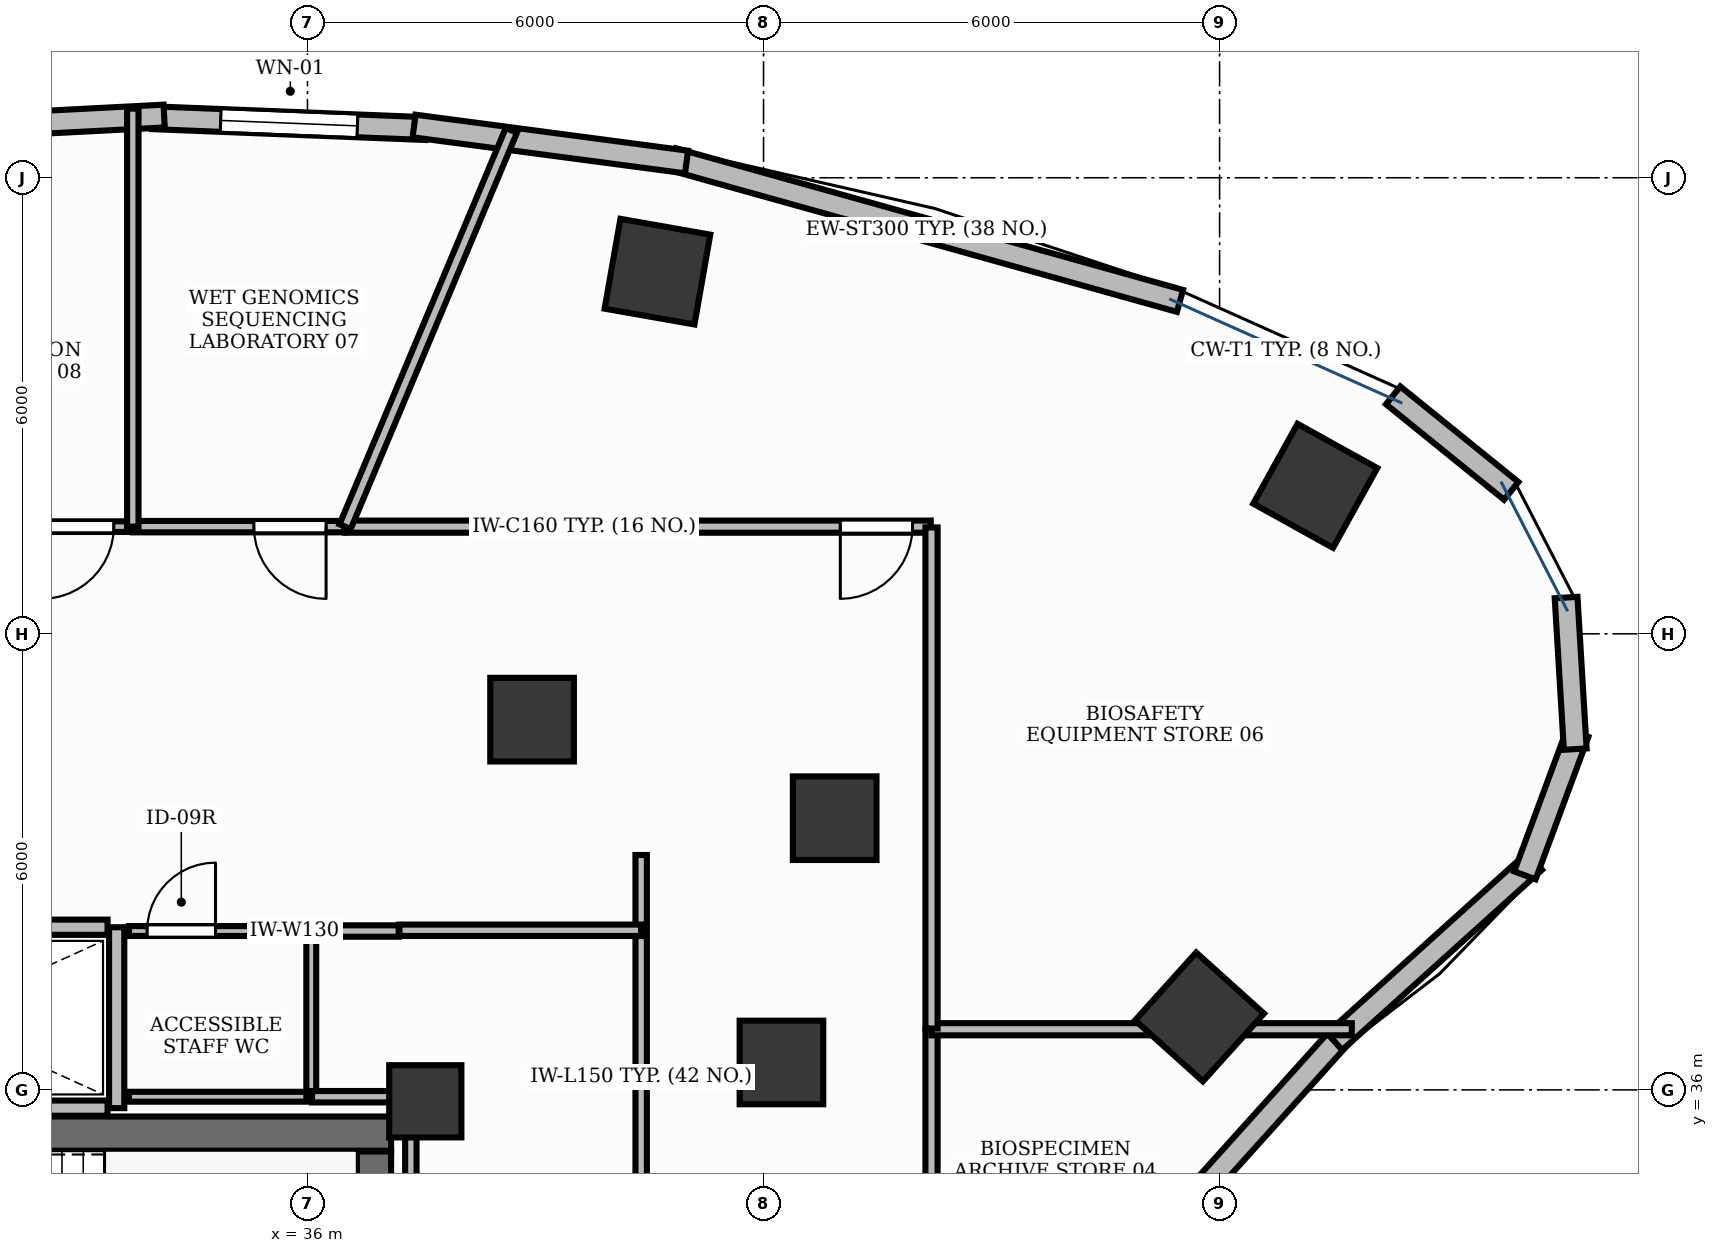
"""IFC4 building model, lengths in metres.
Left out: names, types, materials, properties, quantities, classifications, styles, units other than length and angle.
Written with IfcOpenShell. Run it as: python <this file> out.ifc"""

import sys

from ifc_helpers import new_model, si_unit, direction, frame, frame_2d, origin, origin_2d, place, context, subcontext, project, spatial, rectangle, extrude, element, fill, save


model = new_model("IFC4")
c1 = context("Model", 3, precision=1e-05, world=origin(), true_north=direction((0.0, 1.0)))
c2 = subcontext(c1, "Body", "Model", "MODEL_VIEW")
j1 = project(units=[si_unit("LENGTHUNIT", "METRE"), si_unit("PLANEANGLEUNIT", "RADIAN")], contexts=[c1])
p1 = place(None, origin())
s1 = spatial("IfcSite", under=j1, at=p1, CompositionType="ELEMENT")
p2 = place(p1, origin())
s2 = spatial("IfcBuilding", under=s1, at=p2, CompositionType="ELEMENT")
p3 = place(p2, frame((0.0, 0.0, 102.6)))
s3 = spatial("IfcBuildingStorey", under=s2, at=p3, CompositionType="ELEMENT", Elevation=102.6)
p4 = place(p3, frame((28.852, 35.425, 0.0), z_axis=(0.0, 0.0, 1.0), x_axis=(1.0, 0.0, 0.0)))
e1 = element("IfcWall", 1, at=p4, inside=s3, PredefinedType="SHEAR", context=c2, shape_type="SweptSolid", body=[
    extrude(rectangle(XDim=8.248, YDim=0.45, at=frame_2d((4.124, 0.0))), origin(), (0.0, 0.0, 1.0), 3.9),
])
p5 = place(p3, frame((36.875, 32.11, 0.0), z_axis=(0.0, 0.0, 1.0), x_axis=(0.0, 1.0, 0.0)))
e2 = element("IfcWall", 2, at=p5, inside=s3, PredefinedType="SHEAR", context=c2, shape_type="SweptSolid", body=[
    extrude(rectangle(XDim=3.08, YDim=0.45, at=frame_2d((1.54, 0.0))), origin(), (0.0, 0.0, 1.0), 3.9),
])
p6 = place(p3, frame((37.55, 35.85, -0.0), z_axis=(0.0, 0.0, 1.0), x_axis=(1.0, 0.0, 0.0)))
e3 = element("IfcColumn", 3, at=p6, inside=s3, PredefinedType="PILASTER", context=c2, shape_type="SweptSolid", body=[
    extrude(rectangle(XDim=0.95, YDim=0.95, at=origin_2d()), origin(), (0.0, 0.0, 1.0), 3.901),
])
p7 = place(p3, frame((49.259, 43.947, -0.0), z_axis=(0.0, 0.0, 1.0), x_axis=(-0.874535078577, 0.484962262797, 0.0)))
e4 = element("IfcColumn", 4, at=p7, inside=s3, PredefinedType="COLUMN", context=c2, shape_type="SweptSolid", body=[
    extrude(rectangle(XDim=1.2, YDim=1.2, at=origin_2d()), origin(), (0.0, 0.0, 1.0), 3.901),
])
p8 = place(p3, frame((42.936, 39.575, -0.0), z_axis=(0.0, 0.0, 1.0), x_axis=(1.0, 0.0, 0.0)))
e5 = element("IfcColumn", 5, at=p8, inside=s3, PredefinedType="COLUMN", context=c2, shape_type="SweptSolid", body=[
    extrude(rectangle(XDim=1.1, YDim=1.1, at=origin_2d()), origin(), (0.0, 0.0, 1.0), 3.901),
])
p9 = place(p3, frame((40.604, 46.765, -0.0), z_axis=(0.0, 0.0, 1.0), x_axis=(-0.984868307662, 0.173304404339, 0.0)))
e6 = element("IfcColumn", 6, at=p9, inside=s3, PredefinedType="COLUMN", context=c2, shape_type="SweptSolid", body=[
    extrude(rectangle(XDim=1.2, YDim=1.2, at=origin_2d()), origin(), (0.0, 0.0, 1.0), 3.901),
])
p10 = place(p3, frame((38.955, 40.871, -0.0), z_axis=(0.0, 0.0, 1.0), x_axis=(1.0, 0.0, 0.0)))
e7 = element("IfcColumn", 7, at=p10, inside=s3, PredefinedType="COLUMN", context=c2, shape_type="SweptSolid", body=[
    extrude(rectangle(XDim=1.1, YDim=1.1, at=origin_2d()), origin(), (0.0, 0.0, 1.0), 3.901),
])
p11 = place(p3, frame((47.736, 36.96, -0.0), z_axis=(0.0, 0.0, 1.0), x_axis=(0.669130606359, 0.743144825477, 0.0)))
e8 = element("IfcColumn", 8, at=p11, inside=s3, PredefinedType="COLUMN", context=c2, shape_type="SweptSolid", body=[
    extrude(rectangle(XDim=1.2, YDim=1.2, at=origin_2d()), origin(), (0.0, 0.0, 1.0), 3.901),
])
p12 = place(p3, frame((42.236, 36.361, -0.0), z_axis=(0.0, 0.0, 1.0), x_axis=(1.0, 0.0, 0.0)))
e9 = element("IfcColumn", 9, at=p12, inside=s3, PredefinedType="COLUMN", context=c2, shape_type="SweptSolid", body=[
    extrude(rectangle(XDim=1.1, YDim=1.1, at=origin_2d()), origin(), (0.0, 0.0, 1.0), 3.901),
])
p13 = place(p3, frame((37.554, 48.647, 0.0), z_axis=(0.0, 0.0, 1.0), x_axis=(-0.999210691503, 0.039723972445, 0.0)))
e10 = element("IfcWall", 10, at=p13, inside=s3, PredefinedType="STANDARD", context=c2, shape_type="SweptSolid", body=[
    extrude(rectangle(XDim=3.595, YDim=0.3, at=frame_2d((1.798, 0.0))), origin(), (0.0, 0.0, 1.0), 3.9),
])
p14 = place(p13, frame((0.898, 0.0, 0.9)))
e11 = element("IfcOpeningElement", 11, at=p14, cuts=e10, PredefinedType="OPENING", context=c2, shape_type="SweptSolid", body=[
    extrude(rectangle(XDim=1.8, YDim=2.1, at=frame_2d((0.9, 1.05))), frame((0.0, 0.165, 0.0), z_axis=(0.0, -1.0, 0.0), x_axis=(1.0, 0.0, 0.0)), (0.0, 0.0, 1.0), 0.33),
])
p15 = place(p3, frame((47.479, 46.38, 0.0), z_axis=(0.0, 0.0, 1.0), x_axis=(-0.963116215402, 0.269085777459, 0.0)))
e12 = element("IfcWall", 12, at=p15, inside=s3, PredefinedType="STANDARD", context=c2, shape_type="SweptSolid", body=[
    extrude(rectangle(XDim=6.924, YDim=0.3, at=frame_2d((3.462, 0.0))), origin(), (0.0, 0.0, 1.0), 3.9),
])
p16 = place(p3, frame((40.987, 48.207, 0.0), z_axis=(0.0, 0.0, 1.0), x_axis=(-0.991372969521, 0.131071107816, 0.0)))
e13 = element("IfcWall", 13, at=p16, inside=s3, PredefinedType="STANDARD", context=c2, shape_type="SweptSolid", body=[
    extrude(rectangle(XDim=3.615, YDim=0.3, at=frame_2d((1.808, 0.0))), origin(), (0.0, 0.0, 1.0), 3.9),
])
p17 = place(p3, frame((34.115, 48.812, 0.0), z_axis=(0.0, 0.0, 1.0), x_axis=(-0.998674767218, -0.051465613004, 0.0)))
e14 = element("IfcWall", 14, at=p17, inside=s3, PredefinedType="STANDARD", context=c2, shape_type="SweptSolid", body=[
    extrude(rectangle(XDim=3.634, YDim=0.3, at=frame_2d((1.817, 0.0))), origin(), (0.0, 0.0, 1.0), 3.9),
])
p18 = place(p3, frame((47.437, 34.319, 0.0), z_axis=(0.0, 0.0, 1.0), x_axis=(0.669167727967, 0.743111399353, 0.0)))
e15 = element("IfcWall", 15, at=p18, inside=s3, PredefinedType="STANDARD", context=c2, shape_type="SweptSolid", body=[
    extrude(rectangle(XDim=3.255, YDim=0.3, at=frame_2d((1.628, 0.0))), origin(), (0.0, 0.0, 1.0), 3.9),
])
p19 = place(p3, frame((49.513, 36.636, 0.0), z_axis=(0.0, 0.0, 1.0), x_axis=(0.74255963233, 0.669779958221, 0.0)))
e16 = element("IfcWall", 16, at=p19, inside=s3, PredefinedType="STANDARD", context=c2, shape_type="SweptSolid", body=[
    extrude(rectangle(XDim=3.539, YDim=0.3, at=frame_2d((1.77, 0.0))), origin(), (0.0, 0.0, 1.0), 3.9),
])
p20 = place(p3, frame((52.016, 38.822, 0.0), z_axis=(0.0, 0.0, 1.0), x_axis=(0.347370087337, 0.937728117539, 0.0)))
e17 = element("IfcWall", 17, at=p20, inside=s3, PredefinedType="STANDARD", context=c2, shape_type="SweptSolid", body=[
    extrude(rectangle(XDim=1.997, YDim=0.3, at=frame_2d((0.999, 0.0))), origin(), (0.0, 0.0, 1.0), 3.9),
])
for number, where, z_axis, x_axis in (
    (18, (52.679, 40.483, 0.0), (0.0, 0.0, 1.0), (-0.06, 0.998, 0.0)),
    (19, (51.836, 43.881, 0.0), (0.0, 0.0, 1.0), (-0.777, 0.629, 0.0)),
):
    element("IfcWall", number, at=place(p3, frame(where, z_axis=z_axis, x_axis=x_axis)), inside=s3, PredefinedType="STANDARD", context=c2, shape_type="SweptSolid", body=[
        extrude(rectangle(XDim=1.998, YDim=0.3, at=frame_2d((0.999, 0.0))), origin(), (0.0, 0.0, 1.0), 3.9),
    ])
p21 = place(p3, frame((33.49, 35.76, 0.0), z_axis=(0.0, 0.0, 1.0), x_axis=(0.0, 1.0, 0.0)))
e20 = element("IfcWall", 20, at=p21, inside=s3, PredefinedType="PARTITIONING", context=c2, shape_type="SweptSolid", body=[
    extrude(rectangle(XDim=2.38, YDim=0.2, at=frame_2d((1.19, 0.0))), origin(), (0.0, 0.0, 1.0), 2.91),
])
for number, where, z_axis, x_axis in (
    (21, (28.8, 35.76, 0.0), (0.0, 0.0, 1.0), (1.0, 0.0, 0.0)),
    (22, (28.8, 38.14, 0.0), (0.0, 0.0, 1.0), (1.0, 0.0, 0.0)),
):
    element("IfcWall", number, at=place(p3, frame(where, z_axis=z_axis, x_axis=x_axis)), inside=s3, PredefinedType="PARTITIONING", context=c2, shape_type="SweptSolid", body=[
        extrude(rectangle(XDim=4.57, YDim=0.2, at=frame_2d((2.285, 0.0))), origin(), (0.0, 0.0, 1.0), 2.91),
    ])
p22 = place(p3, frame((33.65, 38.09, 0.0), z_axis=(0.0, 0.0, 1.0), x_axis=(1.0, 0.0, 0.0)))
e23 = element("IfcWall", 23, at=p22, inside=s3, PredefinedType="PARTITIONING", context=c2, shape_type="SweptSolid", body=[
    extrude(rectangle(XDim=2.4, YDim=0.13, at=frame_2d((1.2, 0.0))), origin(), (0.0, 0.0, 1.0), 2.91),
])
p23 = place(p22, frame((0.24, 0.0, 0.0)))
e24 = element("IfcOpeningElement", 24, at=p23, cuts=e23, PredefinedType="OPENING", context=c2, shape_type="SweptSolid", body=[
    extrude(rectangle(XDim=0.9, YDim=2.15, at=frame_2d((0.45, 1.075))), frame((0.0, 0.08, 0.0), z_axis=(0.0, -1.0, 0.0), x_axis=(1.0, 0.0, 0.0)), (0.0, 0.0, 1.0), 0.16),
])
p24 = place(p3, frame((40.39, 39.09, 0.0), z_axis=(0.0, 0.0, 1.0), x_axis=(0.0, -1.0, 0.0)))
e25 = element("IfcWall", 25, at=p24, inside=s3, PredefinedType="PARTITIONING", context=c2, shape_type="SweptSolid", body=[
    extrude(rectangle(XDim=10.235, YDim=0.15, at=frame_2d((5.117, 0.0))), origin(), (0.0, 0.0, 1.0), 2.91),
])
p25 = place(p24, frame((6.063, 0.0, 0.0)))
e26 = element("IfcOpeningElement", 26, at=p25, cuts=e25, PredefinedType="OPENING", context=c2, shape_type="SweptSolid", body=[
    extrude(rectangle(XDim=0.95, YDim=2.15, at=frame_2d((0.475, 1.075))), frame((0.0, 0.09, 0.0), z_axis=(0.0, -1.0, 0.0), x_axis=(1.0, 0.0, 0.0)), (0.0, 0.0, 1.0), 0.18),
])
p26 = place(p3, frame((44.2, 43.41, 0.0), z_axis=(0.0, 0.0, 1.0), x_axis=(-1.0, 0.0, 0.0)))
e27 = element("IfcWall", 27, at=p26, inside=s3, PredefinedType="PARTITIONING", context=c2, shape_type="SweptSolid", body=[
    extrude(rectangle(XDim=7.705, YDim=0.16, at=frame_2d((3.853, 0.0))), origin(), (0.0, 0.0, 1.0), 2.91),
])
p27 = place(p26, frame((0.24, 0.0, 0.0)))
e28 = element("IfcOpeningElement", 28, at=p27, cuts=e27, PredefinedType="OPENING", context=c2, shape_type="SweptSolid", body=[
    extrude(rectangle(XDim=0.95, YDim=2.15, at=frame_2d((0.475, 1.075))), frame((0.0, 0.095, 0.0), z_axis=(0.0, -1.0, 0.0), x_axis=(1.0, 0.0, 0.0)), (0.0, 0.0, 1.0), 0.19),
])
p28 = place(p3, frame((36.485, 43.41, 0.0), z_axis=(0.0, 0.0, 1.0), x_axis=(-1.0, 0.0, 0.0)))
e29 = element("IfcWall", 29, at=p28, inside=s3, PredefinedType="PARTITIONING", context=c2, shape_type="SweptSolid", body=[
    extrude(rectangle(XDim=2.783, YDim=0.15, at=frame_2d((1.392, 0.0))), origin(), (0.0, 0.0, 1.0), 2.91),
])
p29 = place(p28, frame((0.24, 0.0, 0.0)))
e30 = element("IfcOpeningElement", 30, at=p29, cuts=e29, PredefinedType="OPENING", context=c2, shape_type="SweptSolid", body=[
    extrude(rectangle(XDim=0.95, YDim=2.15, at=frame_2d((0.475, 1.075))), frame((0.0, 0.09, 0.0), z_axis=(0.0, -1.0, 0.0), x_axis=(1.0, 0.0, 0.0)), (0.0, 0.0, 1.0), 0.18),
])
p30 = place(p3, frame((33.692, 43.41, 0.0), z_axis=(0.0, 0.0, 1.0), x_axis=(-1.0, 0.0, 0.0)))
e31 = element("IfcWall", 31, at=p30, inside=s3, PredefinedType="PARTITIONING", context=c2, shape_type="SweptSolid", body=[
    extrude(rectangle(XDim=13.649, YDim=0.14, at=frame_2d((6.825, 0.0))), origin(), (0.0, 0.0, 1.0), 2.91),
])
p31 = place(p30, frame((0.24, 0.0, 0.0)))
e32 = element("IfcOpeningElement", 32, at=p31, cuts=e31, PredefinedType="OPENING", context=c2, shape_type="SweptSolid", body=[
    extrude(rectangle(XDim=0.95, YDim=2.15, at=frame_2d((0.475, 1.075))), frame((0.0, 0.085, 0.0), z_axis=(0.0, -1.0, 0.0), x_axis=(1.0, 0.0, 0.0)), (0.0, 0.0, 1.0), 0.17),
])
p32 = place(p3, frame((36.05, 35.91, 0.0), z_axis=(0.0, 0.0, 1.0), x_axis=(-1.0, 0.0, 0.0)))
e33 = element("IfcWall", 33, at=p32, inside=s3, PredefinedType="PARTITIONING", context=c2, shape_type="SweptSolid", body=[
    extrude(rectangle(XDim=2.4, YDim=0.13, at=frame_2d((1.2, 0.0))), origin(), (0.0, 0.0, 1.0), 2.91),
])
p33 = place(p3, frame((36.05, 38.09, 0.0), z_axis=(0.0, 0.0, 1.0), x_axis=(0.0, -1.0, 0.0)))
e34 = element("IfcWall", 34, at=p33, inside=s3, PredefinedType="PARTITIONING", context=c2, shape_type="SweptSolid", body=[
    extrude(rectangle(XDim=2.18, YDim=0.13, at=frame_2d((1.09, 0.0))), origin(), (0.0, 0.0, 1.0), 2.91),
])
p34 = place(p3, frame((44.21, 33.175, 0.0), z_axis=(0.0, 0.0, 1.0), x_axis=(0.0, 1.0, 0.0)))
e35 = element("IfcWall", 35, at=p34, inside=s3, PredefinedType="PARTITIONING", context=c2, shape_type="SweptSolid", body=[
    extrude(rectangle(XDim=3.623, YDim=0.16, at=frame_2d((1.812, 0.0))), origin(), (0.0, 0.0, 1.0), 2.91),
])
p35 = place(p3, frame((44.21, 36.798, 0.0), z_axis=(0.0, 0.0, 1.0), x_axis=(1.0, 0.0, 0.0)))
e36 = element("IfcWall", 36, at=p35, inside=s3, PredefinedType="PARTITIONING", context=c2, shape_type="SweptSolid", body=[
    extrude(rectangle(XDim=5.53, YDim=0.16, at=frame_2d((2.765, 0.0))), origin(), (0.0, 0.0, 1.0), 2.91),
])
p36 = place(p3, frame((37.36, 28.61, 0.0), z_axis=(0.0, 0.0, 1.0), x_axis=(0.0, 1.0, 0.0)))
e37 = element("IfcWall", 37, at=p36, inside=s3, PredefinedType="PARTITIONING", context=c2, shape_type="SweptSolid", body=[
    extrude(rectangle(XDim=7.29, YDim=0.15, at=frame_2d((3.645, 0.0))), origin(), (0.0, 0.0, 1.0), 2.91),
])
p37 = place(p3, frame((37.35, 35.91, 0.0), z_axis=(0.0, 0.0, 1.0), x_axis=(-1.0, 0.0, 0.0)))
e38 = element("IfcWall", 38, at=p37, inside=s3, PredefinedType="PARTITIONING", context=c2, shape_type="SweptSolid", body=[
    extrude(rectangle(XDim=1.29, YDim=0.15, at=frame_2d((0.645, 0.0))), origin(), (0.0, 0.0, 1.0), 2.91),
])
p38 = place(p3, frame((36.06, 38.09, 0.0), z_axis=(0.0, 0.0, 1.0), x_axis=(1.0, 0.0, 0.0)))
e39 = element("IfcWall", 39, at=p38, inside=s3, PredefinedType="PARTITIONING", context=c2, shape_type="SweptSolid", body=[
    extrude(rectangle(XDim=1.14, YDim=0.15, at=frame_2d((0.57, 0.0))), origin(), (0.0, 0.0, 1.0), 2.91),
])
p39 = place(p3, frame((37.21, 38.1, 0.0), z_axis=(0.0, 0.0, 1.0), x_axis=(1.0, 0.0, 0.0)))
e40 = element("IfcWall", 40, at=p39, inside=s3, PredefinedType="PARTITIONING", context=c2, shape_type="SweptSolid", body=[
    extrude(rectangle(XDim=3.18, YDim=0.15, at=frame_2d((1.59, 0.0))), origin(), (0.0, 0.0, 1.0), 2.91),
])
p40 = place(p3, frame((44.21, 36.808, 0.0), z_axis=(0.0, 0.0, 1.0), x_axis=(0.0, 1.0, 0.0)))
e41 = element("IfcWall", 41, at=p40, inside=s3, PredefinedType="PARTITIONING", context=c2, shape_type="SweptSolid", body=[
    extrude(rectangle(XDim=6.592, YDim=0.16, at=frame_2d((3.296, 0.0))), origin(), (0.0, 0.0, 1.0), 2.91),
])
p41 = place(p3, frame((36.495, 43.41, 0.0), z_axis=(0.0, 0.0, 1.0), x_axis=(0.386877123977, 0.922131276415, 0.0)))
e42 = element("IfcWall", 42, at=p41, inside=s3, PredefinedType="PARTITIONING", context=c2, shape_type="SweptSolid", body=[
    extrude(rectangle(XDim=5.654, YDim=0.16, at=frame_2d((2.827, 0.0))), origin(), (0.0, 0.0, 1.0), 2.91),
])
p42 = place(p3, frame((33.702, 43.41, 0.0), z_axis=(0.0, 0.0, 1.0), x_axis=(0.0, 1.0, 0.0)))
e43 = element("IfcWall", 43, at=p42, inside=s3, PredefinedType="PARTITIONING", context=c2, shape_type="SweptSolid", body=[
    extrude(rectangle(XDim=5.5, YDim=0.15, at=frame_2d((2.75, 0.0))), origin(), (0.0, 0.0, 1.0), 2.91),
])
p43 = place(p14, origin())
e44 = element("IfcWindow", 44, at=p43, inside=s3, PartitioningType="SINGLE_PANEL", PredefinedType="WINDOW", context=c2, shape_type="SweptSolid", body=[
    extrude(rectangle(XDim=1.8, YDim=2.1, at=frame_2d((0.9, 1.05))), frame((0.0, 0.03, 0.0), z_axis=(0.0, -1.0, 0.0), x_axis=(1.0, 0.0, 0.0)), (0.0, 0.0, 1.0), 0.06),
])
fill(e11, e44)
p44 = place(p23, origin())
e45 = element("IfcDoor", 45, at=p44, inside=s3, OperationType="SINGLE_SWING_RIGHT", PredefinedType="DOOR", context=c2, shape_type="SweptSolid", body=[
    extrude(rectangle(XDim=0.9, YDim=2.15, at=frame_2d((0.45, 1.075))), frame((0.0, 0.025, 0.0), z_axis=(0.0, -1.0, 0.0), x_axis=(1.0, 0.0, 0.0)), (0.0, 0.0, 1.0), 0.05),
])
fill(e24, e45)
p45 = place(p27, origin())
e46 = element("IfcDoor", 46, at=p45, inside=s3, OperationType="SINGLE_SWING_RIGHT", PredefinedType="DOOR", context=c2, shape_type="SweptSolid", body=[
    extrude(rectangle(XDim=0.95, YDim=2.15, at=frame_2d((0.475, 1.075))), frame((0.0, 0.025, 0.0), z_axis=(0.0, -1.0, 0.0), x_axis=(1.0, 0.0, 0.0)), (0.0, 0.0, 1.0), 0.05),
])
fill(e28, e46)
p46 = place(p29, origin())
e47 = element("IfcDoor", 47, at=p46, inside=s3, OperationType="SINGLE_SWING_LEFT", PredefinedType="DOOR", context=c2, shape_type="SweptSolid", body=[
    extrude(rectangle(XDim=0.95, YDim=2.15, at=frame_2d((0.475, 1.075))), frame((0.0, 0.025, 0.0), z_axis=(0.0, -1.0, 0.0), x_axis=(1.0, 0.0, 0.0)), (0.0, 0.0, 1.0), 0.05),
])
fill(e30, e47)
p47 = place(p31, origin())
e48 = element("IfcDoor", 48, at=p47, inside=s3, OperationType="SINGLE_SWING_RIGHT", PredefinedType="DOOR", context=c2, shape_type="SweptSolid", body=[
    extrude(rectangle(XDim=0.95, YDim=2.15, at=frame_2d((0.475, 1.075))), frame((0.0, 0.025, 0.0), z_axis=(0.0, -1.0, 0.0), x_axis=(1.0, 0.0, 0.0)), (0.0, 0.0, 1.0), 0.05),
])
fill(e32, e48)
save(model, sys.argv[1])
